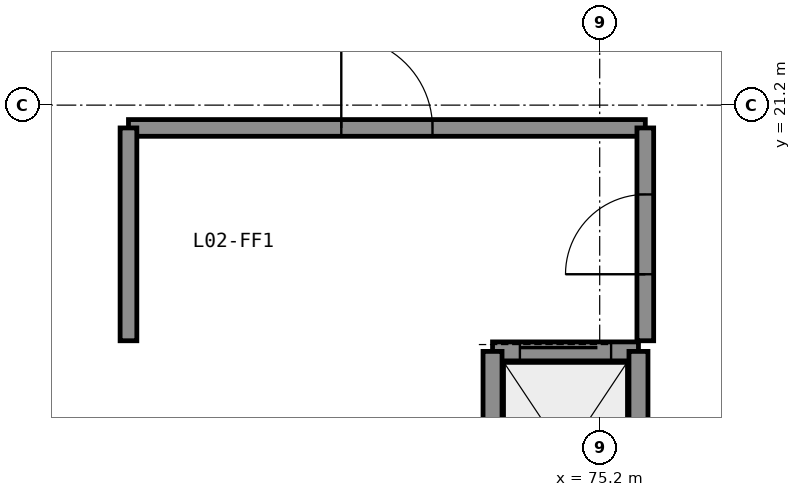
"""IFC4 building model, lengths in metres.
Left out: names, types, materials, properties, quantities, classifications, styles, units other than length and angle.
Written with IfcOpenShell. Run it as: python <this file> out.ifc"""

import sys

from ifc_helpers import new_model, si_unit, direction, frame, frame_2d, origin, place, context, subcontext, project, spatial, rectangle, extrude, element, fill, save


model = new_model("IFC4")
c1 = context("Model", 3, precision=1e-05, world=origin(), true_north=direction((0.0, 1.0)))
c2 = subcontext(c1, "Body", "Model", "MODEL_VIEW")
j1 = project(units=[si_unit("LENGTHUNIT", "METRE"), si_unit("PLANEANGLEUNIT", "RADIAN")], contexts=[c1])
p1 = place(None, origin())
s1 = spatial("IfcSite", under=j1, at=p1, CompositionType="ELEMENT")
p2 = place(p1, origin())
s2 = spatial("IfcBuilding", under=s1, at=p2, CompositionType="ELEMENT")
p3 = place(p2, frame((0.0, 0.0, 9.6)))
s3 = spatial("IfcBuildingStorey", under=s2, at=p3, CompositionType="ELEMENT", Elevation=9.6)
p4 = place(p3, frame((69.0, 20.9, 0.0), z_axis=(0.0, 0.0, 1.0), x_axis=(1.0, 0.0, 0.0)))
e1 = element("IfcWall", 1, at=p4, inside=s3, PredefinedType="SOLIDWALL", context=c2, shape_type="SweptSolid", body=[
    extrude(rectangle(XDim=6.8, YDim=0.22, at=frame_2d((3.4, 0.0))), origin(), (0.0, 0.0, 1.0), 3.93),
])
p5 = place(p4, frame((2.8, 0.0, 0.0)))
e2 = element("IfcOpeningElement", 2, at=p5, cuts=e1, PredefinedType="OPENING", context=c2, shape_type="SweptSolid", body=[
    extrude(rectangle(XDim=1.2, YDim=2.1, at=frame_2d((0.6, 1.05))), frame((0.0, 0.12, 0.0), z_axis=(0.0, -1.0, 0.0), x_axis=(1.0, 0.0, 0.0)), (0.0, 0.0, 1.0), 0.24),
])
p6 = place(p3, frame((69.0, 18.1, 0.0), z_axis=(0.0, 0.0, 1.0), x_axis=(0.0, 1.0, 0.0)))
e3 = element("IfcWall", 3, at=p6, inside=s3, PredefinedType="SOLIDWALL", context=c2, shape_type="SweptSolid", body=[
    extrude(rectangle(XDim=2.8, YDim=0.22, at=frame_2d((1.4, 0.0))), origin(), (0.0, 0.0, 1.0), 3.93),
])
p7 = place(p3, frame((75.8, 18.1, 0.0), z_axis=(0.0, 0.0, 1.0), x_axis=(0.0, 1.0, 0.0)))
e4 = element("IfcWall", 4, at=p7, inside=s3, PredefinedType="SOLIDWALL", context=c2, shape_type="SweptSolid", body=[
    extrude(rectangle(XDim=2.8, YDim=0.22, at=frame_2d((1.4, 0.0))), origin(), (0.0, 0.0, 1.0), 3.93),
])
p8 = place(p7, frame((0.875, 0.0, 0.0)))
e5 = element("IfcOpeningElement", 5, at=p8, cuts=e4, PredefinedType="OPENING", context=c2, shape_type="SweptSolid", body=[
    extrude(rectangle(XDim=1.05, YDim=2.1, at=frame_2d((0.525, 1.05))), frame((0.0, 0.12, 0.0), z_axis=(0.0, -1.0, 0.0), x_axis=(1.0, 0.0, 0.0)), (0.0, 0.0, 1.0), 0.24),
])
p9 = place(p3, frame((73.79, 17.96, 0.0), z_axis=(0.0, 0.0, 1.0), x_axis=(1.0, 0.0, 0.0)))
e6 = element("IfcWall", 6, at=p9, inside=s3, PredefinedType="SHEAR", context=c2, shape_type="SweptSolid", body=[
    extrude(rectangle(XDim=1.92, YDim=0.25, at=frame_2d((0.96, 0.0))), origin(), (0.0, 0.0, 1.0), 3.95),
])
p10 = place(p9, frame((0.36, 0.0, 0.0)))
e7 = element("IfcOpeningElement", 7, at=p10, cuts=e6, PredefinedType="OPENING", context=c2, shape_type="SweptSolid", body=[
    extrude(rectangle(XDim=1.2, YDim=2.2, at=frame_2d((0.6, 1.1))), frame((0.0, 0.135, 0.0), z_axis=(0.0, -1.0, 0.0), x_axis=(1.0, 0.0, 0.0)), (0.0, 0.0, 1.0), 0.27),
])
for number, where, z_axis, x_axis in (
    (8, (73.79, 15.24, 0.0), (0.0, 0.0, 1.0), (0.0, 1.0, 0.0)),
    (9, (75.71, 15.24, 0.0), (0.0, 0.0, 1.0), (0.0, 1.0, 0.0)),
):
    element("IfcWall", number, at=place(p3, frame(where, z_axis=z_axis, x_axis=x_axis)), inside=s3, PredefinedType="SHEAR", context=c2, shape_type="SweptSolid", body=[
        extrude(rectangle(XDim=2.72, YDim=0.25, at=frame_2d((1.36, 0.0))), origin(), (0.0, 0.0, 1.0), 3.95),
    ])
p11 = place(p5, origin())
e10 = element("IfcDoor", 10, at=p11, inside=s3, OperationType="SINGLE_SWING_LEFT", PredefinedType="DOOR", context=c2, shape_type="SweptSolid", body=[
    extrude(rectangle(XDim=1.2, YDim=2.1, at=frame_2d((0.6, 1.05))), frame((0.0, 0.025, 0.0), z_axis=(0.0, -1.0, 0.0), x_axis=(1.0, 0.0, 0.0)), (0.0, 0.0, 1.0), 0.05),
])
fill(e2, e10)
p12 = place(p8, origin())
e11 = element("IfcDoor", 11, at=p12, inside=s3, OperationType="SINGLE_SWING_LEFT", PredefinedType="DOOR", context=c2, shape_type="SweptSolid", body=[
    extrude(rectangle(XDim=1.05, YDim=2.1, at=frame_2d((0.525, 1.05))), frame((0.0, 0.025, 0.0), z_axis=(0.0, -1.0, 0.0), x_axis=(1.0, 0.0, 0.0)), (0.0, 0.0, 1.0), 0.05),
])
fill(e5, e11)
p13 = place(p10, origin())
e12 = element("IfcDoor", 12, at=p13, inside=s3, OperationType="SLIDING_TO_LEFT", PredefinedType="DOOR", context=c2, shape_type="SweptSolid", body=[
    extrude(rectangle(XDim=1.2, YDim=2.2, at=frame_2d((0.6, 1.1))), frame((0.0, 0.025, 0.0), z_axis=(0.0, -1.0, 0.0), x_axis=(1.0, 0.0, 0.0)), (0.0, 0.0, 1.0), 0.05),
])
fill(e7, e12)
save(model, sys.argv[1])
